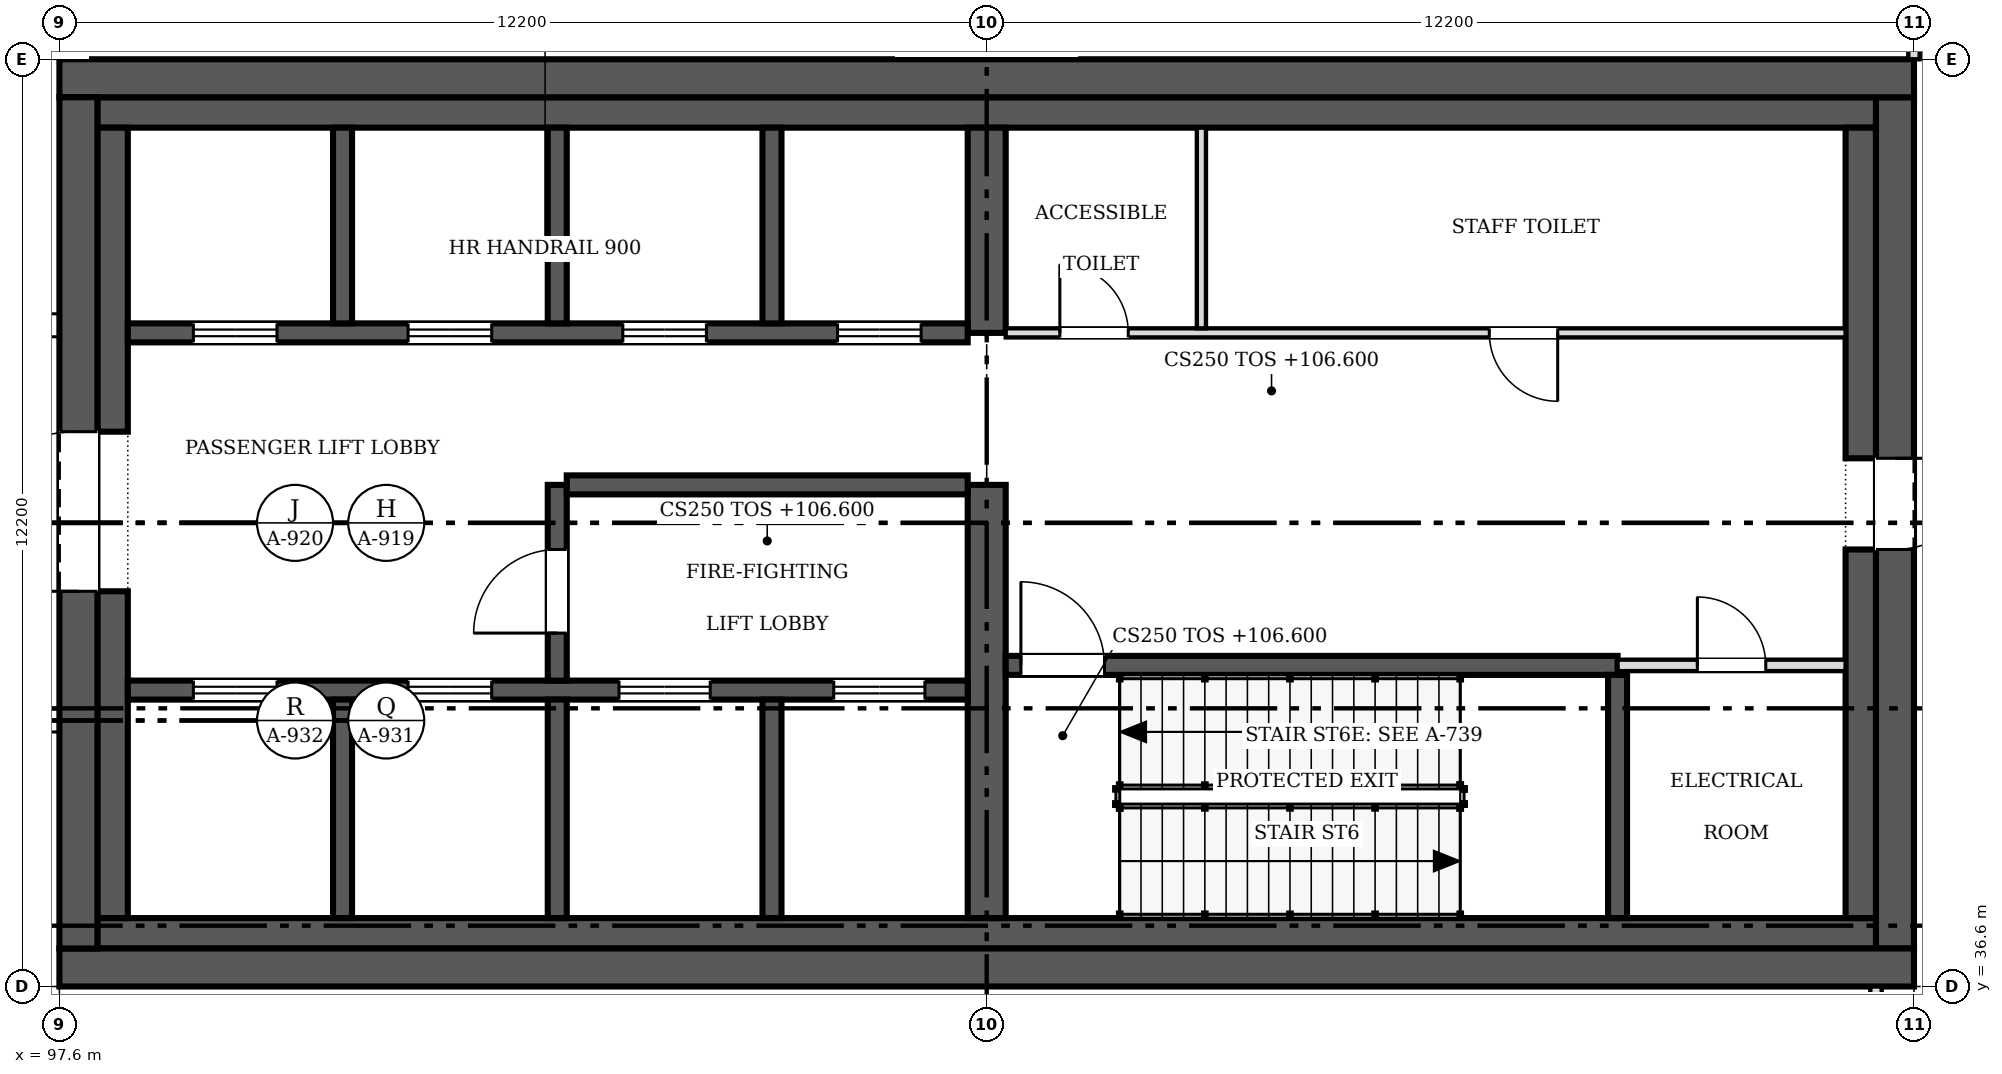
"""IFC4 building model, lengths in metres.
Left out: names, types, materials, properties, quantities, classifications, styles, units other than length and angle.
Written with IfcOpenShell. Run it as: python <this file> out.ifc"""

import sys

from ifc_helpers import new_model, si_unit, direction, frame, frame_2d, origin, place, context, subcontext, project, spatial, rectangle, extrude, source, transform, mapped, element, fill, save


model = new_model("IFC4")
c1 = context("Model", 3, precision=1e-05, world=origin(), true_north=direction((0.0, 1.0)))
c2 = subcontext(c1, "Body", "Model", "MODEL_VIEW")
j1 = project(units=[si_unit("LENGTHUNIT", "METRE"), si_unit("PLANEANGLEUNIT", "RADIAN")], contexts=[c1])
p1 = place(None, origin())
s1 = spatial("IfcSite", under=j1, at=p1, CompositionType="ELEMENT")
p2 = place(p1, origin())
s2 = spatial("IfcBuilding", under=s1, at=p2, CompositionType="ELEMENT")
p3 = place(p2, frame((0.0, 0.0, 106.6)))
s3 = spatial("IfcBuildingStorey", under=s2, at=p3, CompositionType="ELEMENT", Elevation=106.6)
p4 = place(p3, frame((122.0, 36.85, 0.0), z_axis=(0.0, 0.0, 1.0), x_axis=(-1.0, 0.0, 0.0)))
e1 = element("IfcWall", 1, at=p4, inside=s3, PredefinedType="SHEAR", context=c2, shape_type="SweptSolid", body=[
    extrude(rectangle(XDim=24.4, YDim=0.5, at=frame_2d((12.2, 0.0))), origin(), (0.0, 0.0, 1.0), 6.0),
])
p5 = place(p3, frame((97.85, 37.1, 0.0), z_axis=(0.0, 0.0, 1.0), x_axis=(0.0, 1.0, 0.0)))
e2 = element("IfcWall", 2, at=p5, inside=s3, PredefinedType="SHEAR", context=c2, shape_type="SweptSolid", body=[
    extrude(rectangle(XDim=11.2, YDim=0.5, at=frame_2d((5.6, 0.0))), origin(), (0.0, 0.0, 1.0), 6.0),
])
m1 = source(origin(), c2, "Body", "SweptSolid", [
    extrude(rectangle(XDim=2.1, YDim=2.4, at=frame_2d((1.05, 1.2))), frame((0.0, 0.26, 0.0), z_axis=(0.0, -1.0, 0.0), x_axis=(1.0, 0.0, 0.0)), (0.0, 0.0, 1.0), 0.52),
])
p6 = place(p5, frame((4.7, 0.0, 0.0)))
e3 = element("IfcOpeningElement", 3, at=p6, cuts=e2, PredefinedType="OPENING", context=c2, shape_type="MappedRepresentation", body=[
    mapped(m1, transform((0.0, 0.0, 0.0), scale=1.0)),
])
p7 = place(p3, frame((97.6, 48.55, 0.0), z_axis=(0.0, 0.0, 1.0), x_axis=(1.0, 0.0, 0.0)))
e4 = element("IfcWall", 4, at=p7, inside=s3, PredefinedType="SHEAR", context=c2, shape_type="SweptSolid", body=[
    extrude(rectangle(XDim=24.4, YDim=0.5, at=frame_2d((12.2, 0.0))), origin(), (0.0, 0.0, 1.0), 6.0),
])
p8 = place(p3, frame((121.75, 48.3, 0.0), z_axis=(0.0, 0.0, 1.0), x_axis=(0.0, -1.0, 0.0)))
e5 = element("IfcWall", 5, at=p8, inside=s3, PredefinedType="SHEAR", context=c2, shape_type="SweptSolid", body=[
    extrude(rectangle(XDim=11.2, YDim=0.5, at=frame_2d((5.6, 0.0))), origin(), (0.0, 0.0, 1.0), 6.0),
])
m2 = source(origin(), c2, "Body", "SweptSolid", [
    extrude(rectangle(XDim=1.2, YDim=2.1, at=frame_2d((0.6, 1.05))), frame((0.0, 0.26, 0.0), z_axis=(0.0, -1.0, 0.0), x_axis=(1.0, 0.0, 0.0)), (0.0, 0.0, 1.0), 0.52),
])
p9 = place(p8, frame((4.75, 0.0, 0.0)))
e6 = element("IfcOpeningElement", 6, at=p9, cuts=e5, PredefinedType="OPENING", context=c2, shape_type="MappedRepresentation", body=[
    mapped(m2, transform((0.0, 0.0, 0.0), scale=1.0)),
])
for number, where, z_axis, x_axis in (
    (7, (98.1, 37.3, 0.0), (0.0, 0.0, 1.0), (1.0, 0.0, 0.0)),
    (8, (98.1, 48.1, 0.0), (0.0, 0.0, 1.0), (1.0, 0.0, 0.0)),
):
    element("IfcWall", number, at=place(p3, frame(where, z_axis=z_axis, x_axis=x_axis)), inside=s3, PredefinedType="SOLIDWALL", context=c2, shape_type="SweptSolid", body=[
        extrude(rectangle(XDim=23.4, YDim=0.4, at=frame_2d((11.7, 0.0))), origin(), (0.0, 0.0, 1.0), 6.0),
    ])
p10 = place(p3, frame((98.3, 37.5, 0.0), z_axis=(0.0, 0.0, 1.0), x_axis=(0.0, 1.0, 0.0)))
e9 = element("IfcWall", 9, at=p10, inside=s3, PredefinedType="SOLIDWALL", context=c2, shape_type="SweptSolid", body=[
    extrude(rectangle(XDim=4.3, YDim=0.4, at=frame_2d((2.15, 0.0))), origin(), (0.0, 0.0, 1.0), 6.0),
])
p11 = place(p3, frame((98.3, 43.9, 0.0), z_axis=(0.0, 0.0, 1.0), x_axis=(0.0, 1.0, 0.0)))
e10 = element("IfcWall", 10, at=p11, inside=s3, PredefinedType="SOLIDWALL", context=c2, shape_type="SweptSolid", body=[
    extrude(rectangle(XDim=4.0, YDim=0.4, at=frame_2d((2.0, 0.0))), origin(), (0.0, 0.0, 1.0), 6.0),
])
p12 = place(p3, frame((121.3, 37.5, 0.0), z_axis=(0.0, 0.0, 1.0), x_axis=(0.0, 1.0, 0.0)))
e11 = element("IfcWall", 11, at=p12, inside=s3, PredefinedType="SOLIDWALL", context=c2, shape_type="SweptSolid", body=[
    extrude(rectangle(XDim=4.85, YDim=0.4, at=frame_2d((2.425, 0.0))), origin(), (0.0, 0.0, 1.0), 6.0),
])
p13 = place(p3, frame((121.3, 43.55, 0.0), z_axis=(0.0, 0.0, 1.0), x_axis=(0.0, 1.0, 0.0)))
e12 = element("IfcWall", 12, at=p13, inside=s3, PredefinedType="SOLIDWALL", context=c2, shape_type="SweptSolid", body=[
    extrude(rectangle(XDim=4.35, YDim=0.4, at=frame_2d((2.175, 0.0))), origin(), (0.0, 0.0, 1.0), 6.0),
])
p14 = place(p3, frame((109.8, 37.5, 0.0), z_axis=(0.0, 0.0, 1.0), x_axis=(0.0, 1.0, 0.0)))
e13 = element("IfcWall", 13, at=p14, inside=s3, PredefinedType="SHEAR", context=c2, shape_type="SweptSolid", body=[
    extrude(rectangle(XDim=5.7, YDim=0.5, at=frame_2d((2.85, 0.0))), origin(), (0.0, 0.0, 1.0), 6.0),
])
p15 = place(p3, frame((109.8, 45.2, 0.0), z_axis=(0.0, 0.0, 1.0), x_axis=(0.0, 1.0, 0.0)))
e14 = element("IfcWall", 14, at=p15, inside=s3, PredefinedType="SHEAR", context=c2, shape_type="SweptSolid", body=[
    extrude(rectangle(XDim=2.7, YDim=0.5, at=frame_2d((1.35, 0.0))), origin(), (0.0, 0.0, 1.0), 6.0),
])
p16 = place(p3, frame((98.5, 40.5, 0.0), z_axis=(0.0, 0.0, 1.0), x_axis=(1.0, 0.0, 0.0)))
e15 = element("IfcWall", 15, at=p16, inside=s3, PredefinedType="SOLIDWALL", context=c2, shape_type="SweptSolid", body=[
    extrude(rectangle(XDim=11.05, YDim=0.25, at=frame_2d((5.525, 0.0))), origin(), (0.0, 0.0, 1.0), 6.0),
])
m3 = source(origin(), c2, "Body", "SweptSolid", [
    extrude(rectangle(XDim=1.1, YDim=2.1, at=frame_2d((0.55, 1.05))), frame((0.0, 0.135, 0.0), z_axis=(0.0, -1.0, 0.0), x_axis=(1.0, 0.0, 0.0)), (0.0, 0.0, 1.0), 0.27),
])
p17 = place(p16, frame((0.863, 0.0, 0.0)))
e16 = element("IfcOpeningElement", 16, at=p17, cuts=e15, PredefinedType="OPENING", context=c2, shape_type="MappedRepresentation", body=[
    mapped(m3, transform((0.0, 0.0, 0.0), scale=1.0)),
])
p18 = place(p16, frame((3.688, 0.0, 0.0)))
e17 = element("IfcOpeningElement", 17, at=p18, cuts=e15, PredefinedType="OPENING", context=c2, shape_type="MappedRepresentation", body=[
    mapped(m3, transform((0.0, 0.0, 0.0), scale=1.0)),
])
m4 = source(origin(), c2, "Body", "SweptSolid", [
    extrude(rectangle(XDim=1.2, YDim=2.1, at=frame_2d((0.6, 1.05))), frame((0.0, 0.135, 0.0), z_axis=(0.0, -1.0, 0.0), x_axis=(1.0, 0.0, 0.0)), (0.0, 0.0, 1.0), 0.27),
])
p19 = place(p16, frame((6.462, 0.0, 0.0)))
e18 = element("IfcOpeningElement", 18, at=p19, cuts=e15, PredefinedType="OPENING", context=c2, shape_type="MappedRepresentation", body=[
    mapped(m4, transform((0.0, 0.0, 0.0), scale=1.0)),
])
p20 = place(p16, frame((9.288, 0.0, 0.0)))
e19 = element("IfcOpeningElement", 19, at=p20, cuts=e15, PredefinedType="OPENING", context=c2, shape_type="MappedRepresentation", body=[
    mapped(m4, transform((0.0, 0.0, 0.0), scale=1.0)),
])
p21 = place(p3, frame((109.55, 45.2, 0.0), z_axis=(0.0, 0.0, 1.0), x_axis=(-1.0, 0.0, 0.0)))
e20 = element("IfcWall", 20, at=p21, inside=s3, PredefinedType="SOLIDWALL", context=c2, shape_type="SweptSolid", body=[
    extrude(rectangle(XDim=11.05, YDim=0.25, at=frame_2d((5.525, 0.0))), origin(), (0.0, 0.0, 1.0), 6.0),
])
p22 = place(p21, frame((9.087, 0.0, 0.0)))
e21 = element("IfcOpeningElement", 21, at=p22, cuts=e20, PredefinedType="OPENING", context=c2, shape_type="MappedRepresentation", body=[
    mapped(m3, transform((0.0, 0.0, 0.0), scale=1.0)),
])
p23 = place(p21, frame((6.262, 0.0, 0.0)))
e22 = element("IfcOpeningElement", 22, at=p23, cuts=e20, PredefinedType="OPENING", context=c2, shape_type="MappedRepresentation", body=[
    mapped(m3, transform((0.0, 0.0, 0.0), scale=1.0)),
])
p24 = place(p21, frame((3.438, 0.0, 0.0)))
e23 = element("IfcOpeningElement", 23, at=p24, cuts=e20, PredefinedType="OPENING", context=c2, shape_type="MappedRepresentation", body=[
    mapped(m3, transform((0.0, 0.0, 0.0), scale=1.0)),
])
p25 = place(p21, frame((0.613, 0.0, 0.0)))
e24 = element("IfcOpeningElement", 24, at=p25, cuts=e20, PredefinedType="OPENING", context=c2, shape_type="MappedRepresentation", body=[
    mapped(m3, transform((0.0, 0.0, 0.0), scale=1.0)),
])
p26 = place(p3, frame((118.1, 40.825, 0.0), z_axis=(0.0, 0.0, 1.0), x_axis=(-1.0, 0.0, 0.0)))
e25 = element("IfcWall", 25, at=p26, inside=s3, PredefinedType="SOLIDWALL", context=c2, shape_type="SweptSolid", body=[
    extrude(rectangle(XDim=8.05, YDim=0.25, at=frame_2d((4.025, 0.0))), origin(), (0.0, 0.0, 1.0), 6.0),
])
p27 = place(p26, frame((6.75, 0.0, 0.0)))
e26 = element("IfcOpeningElement", 26, at=p27, cuts=e25, PredefinedType="OPENING", context=c2, shape_type="MappedRepresentation", body=[
    mapped(m3, transform((0.0, 0.0, 0.0), scale=1.0)),
])
p28 = place(p3, frame((104.15, 37.5, 0.0), z_axis=(0.0, 0.0, 1.0), x_axis=(0.0, 1.0, 0.0)))
e27 = element("IfcWall", 27, at=p28, inside=s3, PredefinedType="SOLIDWALL", context=c2, shape_type="SweptSolid", body=[
    extrude(rectangle(XDim=2.875, YDim=0.25, at=frame_2d((1.438, 0.0))), origin(), (0.0, 0.0, 1.0), 6.0),
])
p29 = place(p3, frame((104.15, 43.2, 0.0), z_axis=(0.0, 0.0, 1.0), x_axis=(0.0, -1.0, 0.0)))
e28 = element("IfcWall", 28, at=p29, inside=s3, PredefinedType="SOLIDWALL", context=c2, shape_type="SweptSolid", body=[
    extrude(rectangle(XDim=2.575, YDim=0.25, at=frame_2d((1.288, 0.0))), origin(), (0.0, 0.0, 1.0), 6.0),
])
p30 = place(p29, frame((0.85, 0.0, 0.0)))
e29 = element("IfcOpeningElement", 29, at=p30, cuts=e28, PredefinedType="OPENING", context=c2, shape_type="MappedRepresentation", body=[
    mapped(m3, transform((0.0, 0.0, 0.0), scale=1.0)),
])
p31 = place(p3, frame((104.275, 43.2, 0.0), z_axis=(0.0, 0.0, 1.0), x_axis=(1.0, 0.0, 0.0)))
e30 = element("IfcWall", 30, at=p31, inside=s3, PredefinedType="SOLIDWALL", context=c2, shape_type="SweptSolid", body=[
    extrude(rectangle(XDim=5.275, YDim=0.25, at=frame_2d((2.638, 0.0))), origin(), (0.0, 0.0, 1.0), 6.0),
])
p32 = place(p3, frame((118.1, 37.5, 0.0), z_axis=(0.0, 0.0, 1.0), x_axis=(0.0, 1.0, 0.0)))
e31 = element("IfcWall", 31, at=p32, inside=s3, PredefinedType="SOLIDWALL", context=c2, shape_type="SweptSolid", body=[
    extrude(rectangle(XDim=3.2, YDim=0.25, at=frame_2d((1.6, 0.0))), origin(), (0.0, 0.0, 1.0), 6.0),
])
for number, where, z_axis, x_axis in (
    (32, (101.325, 37.5, 0.0), (0.0, 0.0, 1.0), (0.0, 1.0, 0.0)),
    (33, (106.975, 37.5, 0.0), (0.0, 0.0, 1.0), (0.0, 1.0, 0.0)),
):
    element("IfcWall", number, at=place(p3, frame(where, z_axis=z_axis, x_axis=x_axis)), inside=s3, PredefinedType="SOLIDWALL", context=c2, shape_type="SweptSolid", body=[
        extrude(rectangle(XDim=2.875, YDim=0.25, at=frame_2d((1.438, 0.0))), origin(), (0.0, 0.0, 1.0), 6.0),
    ])
for number, where, z_axis, x_axis in (
    (34, (101.325, 45.325, 0.0), (0.0, 0.0, 1.0), (0.0, 1.0, 0.0)),
    (35, (104.15, 45.325, 0.0), (0.0, 0.0, 1.0), (0.0, 1.0, 0.0)),
    (36, (106.975, 45.325, 0.0), (0.0, 0.0, 1.0), (0.0, 1.0, 0.0)),
):
    element("IfcWall", number, at=place(p3, frame(where, z_axis=z_axis, x_axis=x_axis)), inside=s3, PredefinedType="SOLIDWALL", context=c2, shape_type="SweptSolid", body=[
        extrude(rectangle(XDim=2.575, YDim=0.25, at=frame_2d((1.288, 0.0))), origin(), (0.0, 0.0, 1.0), 6.0),
    ])
p33 = place(p3, frame((110.05, 45.2, 0.0), z_axis=(0.0, 0.0, 1.0), x_axis=(1.0, 0.0, 0.0)))
e37 = element("IfcWall", 37, at=p33, inside=s3, PredefinedType="PARTITIONING", context=c2, shape_type="SweptSolid", body=[
    extrude(rectangle(XDim=11.05, YDim=0.12, at=frame_2d((5.525, 0.0))), origin(), (0.0, 0.0, 1.0), 5.8),
])
m5 = source(origin(), c2, "Body", "SweptSolid", [
    extrude(rectangle(XDim=0.9, YDim=2.1, at=frame_2d((0.45, 1.05))), frame((0.0, 0.07, 0.0), z_axis=(0.0, -1.0, 0.0), x_axis=(1.0, 0.0, 0.0)), (0.0, 0.0, 1.0), 0.14),
])
p34 = place(p33, frame((0.712, 0.0, 0.0)))
e38 = element("IfcOpeningElement", 38, at=p34, cuts=e37, PredefinedType="OPENING", context=c2, shape_type="MappedRepresentation", body=[
    mapped(m5, transform((0.0, 0.0, 0.0), scale=1.0)),
])
p35 = place(p33, frame((6.363, 0.0, 0.0)))
e39 = element("IfcOpeningElement", 39, at=p35, cuts=e37, PredefinedType="OPENING", context=c2, shape_type="MappedRepresentation", body=[
    mapped(m5, transform((0.0, 0.0, 0.0), scale=1.0)),
])
p36 = place(p3, frame((121.1, 40.825, 0.0), z_axis=(0.0, 0.0, 1.0), x_axis=(-1.0, 0.0, 0.0)))
e40 = element("IfcWall", 40, at=p36, inside=s3, PredefinedType="PARTITIONING", context=c2, shape_type="SweptSolid", body=[
    extrude(rectangle(XDim=3.0, YDim=0.15, at=frame_2d((1.5, 0.0))), origin(), (0.0, 0.0, 1.0), 5.8),
])
m6 = source(origin(), c2, "Body", "SweptSolid", [
    extrude(rectangle(XDim=0.9, YDim=2.1, at=frame_2d((0.45, 1.05))), frame((0.0, 0.085, 0.0), z_axis=(0.0, -1.0, 0.0), x_axis=(1.0, 0.0, 0.0)), (0.0, 0.0, 1.0), 0.17),
])
p37 = place(p36, frame((1.05, 0.0, 0.0)))
e41 = element("IfcOpeningElement", 41, at=p37, cuts=e40, PredefinedType="OPENING", context=c2, shape_type="MappedRepresentation", body=[
    mapped(m6, transform((0.0, 0.0, 0.0), scale=1.0)),
])
p38 = place(p3, frame((112.625, 45.26, 0.0), z_axis=(0.0, 0.0, 1.0), x_axis=(0.0, 1.0, 0.0)))
e42 = element("IfcWall", 42, at=p38, inside=s3, PredefinedType="PARTITIONING", context=c2, shape_type="SweptSolid", body=[
    extrude(rectangle(XDim=2.64, YDim=0.12, at=frame_2d((1.32, 0.0))), origin(), (0.0, 0.0, 1.0), 5.8),
])
p39 = place(p3, frame((121.5, 36.6, 0.0), z_axis=(0.0, 0.0, 1.0), x_axis=(0.0, -1.0, 0.0)))
e43 = element("IfcWall", 43, at=p39, inside=s3, PredefinedType="PARTITIONING", context=c2, shape_type="SweptSolid", body=[
    extrude(rectangle(XDim=2.324, YDim=0.15, at=frame_2d((1.162, 0.0))), origin(), (0.0, 0.0, 1.0), 5.167),
])
m7 = source(origin(), c2, "Body", "SweptSolid", [
    extrude(rectangle(XDim=1.0, YDim=2.1, at=frame_2d((0.5, 1.05))), frame((0.0, 0.085, 0.0), z_axis=(0.0, -1.0, 0.0), x_axis=(1.0, 0.0, 0.0)), (0.0, 0.0, 1.0), 0.17),
])
p40 = place(p39, frame((0.624, 0.0, 0.0)))
e44 = element("IfcOpeningElement", 44, at=p40, cuts=e43, PredefinedType="OPENING", context=c2, shape_type="MappedRepresentation", body=[
    mapped(m7, transform((0.0, 0.0, 0.0), scale=1.0)),
])
p41 = place(p3, frame((122.0, 48.8, 0.0), z_axis=(0.0, 0.0, 1.0), x_axis=(0.0, 1.0, 0.0)))
e45 = element("IfcWall", 45, at=p41, inside=s3, PredefinedType="PARTITIONING", context=c2, shape_type="SweptSolid", body=[
    extrude(rectangle(XDim=2.324, YDim=0.15, at=frame_2d((1.162, 0.0))), origin(), (0.0, 0.0, 1.0), 5.167),
])
m8 = source(origin(), c2, "Body", "SweptSolid", [
    extrude(rectangle(XDim=2.1, YDim=2.4, at=frame_2d((1.05, 1.2))), frame((0.0, 0.025, 0.0), z_axis=(0.0, -1.0, 0.0), x_axis=(1.0, 0.0, 0.0)), (0.0, 0.0, 1.0), 0.05),
])
p42 = place(p6, origin())
e46 = element("IfcDoor", 46, at=p42, inside=s3, OperationType="DOUBLE_DOOR_SINGLE_SWING", PredefinedType="DOOR", context=c2, shape_type="MappedRepresentation", body=[
    mapped(m8, transform((0.0, 0.0, 0.0), scale=1.0)),
])
fill(e3, e46)
m9 = source(origin(), c2, "Body", "SweptSolid", [
    extrude(rectangle(XDim=1.2, YDim=2.1, at=frame_2d((0.6, 1.05))), frame((0.0, 0.025, 0.0), z_axis=(0.0, -1.0, 0.0), x_axis=(1.0, 0.0, 0.0)), (0.0, 0.0, 1.0), 0.05),
])
p43 = place(p9, origin())
e47 = element("IfcDoor", 47, at=p43, inside=s3, OperationType="SINGLE_SWING_LEFT", PredefinedType="DOOR", context=c2, shape_type="MappedRepresentation", body=[
    mapped(m9, transform((0.0, 0.0, 0.0), scale=1.0)),
])
fill(e6, e47)
m10 = source(origin(), c2, "Body", "SweptSolid", [
    extrude(rectangle(XDim=1.1, YDim=2.1, at=frame_2d((0.55, 1.05))), frame((0.0, 0.025, 0.0), z_axis=(0.0, -1.0, 0.0), x_axis=(1.0, 0.0, 0.0)), (0.0, 0.0, 1.0), 0.05),
])
p44 = place(p17, origin())
e48 = element("IfcDoor", 48, at=p44, inside=s3, OperationType="DOUBLE_DOOR_SLIDING", PredefinedType="DOOR", context=c2, shape_type="MappedRepresentation", body=[
    mapped(m10, transform((0.0, 0.0, 0.0), scale=1.0)),
])
fill(e16, e48)
p45 = place(p18, origin())
e49 = element("IfcDoor", 49, at=p45, inside=s3, OperationType="DOUBLE_DOOR_SLIDING", PredefinedType="DOOR", context=c2, shape_type="MappedRepresentation", body=[
    mapped(m10, transform((0.0, 0.0, 0.0), scale=1.0)),
])
fill(e17, e49)
p46 = place(p19, origin())
e50 = element("IfcDoor", 50, at=p46, inside=s3, OperationType="DOUBLE_DOOR_SLIDING", PredefinedType="DOOR", context=c2, shape_type="MappedRepresentation", body=[
    mapped(m9, transform((0.0, 0.0, 0.0), scale=1.0)),
])
fill(e18, e50)
p47 = place(p20, origin())
e51 = element("IfcDoor", 51, at=p47, inside=s3, OperationType="DOUBLE_DOOR_SLIDING", PredefinedType="DOOR", context=c2, shape_type="MappedRepresentation", body=[
    mapped(m9, transform((0.0, 0.0, 0.0), scale=1.0)),
])
fill(e19, e51)
p48 = place(p22, origin())
e52 = element("IfcDoor", 52, at=p48, inside=s3, OperationType="DOUBLE_DOOR_SLIDING", PredefinedType="DOOR", context=c2, shape_type="MappedRepresentation", body=[
    mapped(m10, transform((0.0, 0.0, 0.0), scale=1.0)),
])
fill(e21, e52)
p49 = place(p23, origin())
e53 = element("IfcDoor", 53, at=p49, inside=s3, OperationType="DOUBLE_DOOR_SLIDING", PredefinedType="DOOR", context=c2, shape_type="MappedRepresentation", body=[
    mapped(m10, transform((0.0, 0.0, 0.0), scale=1.0)),
])
fill(e22, e53)
p50 = place(p24, origin())
e54 = element("IfcDoor", 54, at=p50, inside=s3, OperationType="DOUBLE_DOOR_SLIDING", PredefinedType="DOOR", context=c2, shape_type="MappedRepresentation", body=[
    mapped(m10, transform((0.0, 0.0, 0.0), scale=1.0)),
])
fill(e23, e54)
p51 = place(p25, origin())
e55 = element("IfcDoor", 55, at=p51, inside=s3, OperationType="DOUBLE_DOOR_SLIDING", PredefinedType="DOOR", context=c2, shape_type="MappedRepresentation", body=[
    mapped(m10, transform((0.0, 0.0, 0.0), scale=1.0)),
])
fill(e24, e55)
p52 = place(p27, origin())
e56 = element("IfcDoor", 56, at=p52, inside=s3, OperationType="SINGLE_SWING_RIGHT", PredefinedType="DOOR", context=c2, shape_type="MappedRepresentation", body=[
    mapped(m10, transform((0.0, 0.0, 0.0), scale=1.0)),
])
fill(e26, e56)
p53 = place(p30, origin())
e57 = element("IfcDoor", 57, at=p53, inside=s3, OperationType="SINGLE_SWING_RIGHT", PredefinedType="DOOR", context=c2, shape_type="MappedRepresentation", body=[
    mapped(m10, transform((0.0, 0.0, 0.0), scale=1.0)),
])
fill(e29, e57)
m11 = source(origin(), c2, "Body", "SweptSolid", [
    extrude(rectangle(XDim=0.9, YDim=2.1, at=frame_2d((0.45, 1.05))), frame((0.0, 0.025, 0.0), z_axis=(0.0, -1.0, 0.0), x_axis=(1.0, 0.0, 0.0)), (0.0, 0.0, 1.0), 0.05),
])
p54 = place(p34, origin())
e58 = element("IfcDoor", 58, at=p54, inside=s3, OperationType="SINGLE_SWING_LEFT", PredefinedType="DOOR", context=c2, shape_type="MappedRepresentation", body=[
    mapped(m11, transform((0.0, 0.0, 0.0), scale=1.0)),
])
fill(e38, e58)
p55 = place(p35, origin())
e59 = element("IfcDoor", 59, at=p55, inside=s3, OperationType="SINGLE_SWING_RIGHT", PredefinedType="DOOR", context=c2, shape_type="MappedRepresentation", body=[
    mapped(m11, transform((0.0, 0.0, 0.0), scale=1.0)),
])
fill(e39, e59)
p56 = place(p37, origin())
e60 = element("IfcDoor", 60, at=p56, inside=s3, OperationType="SINGLE_SWING_RIGHT", PredefinedType="DOOR", context=c2, shape_type="MappedRepresentation", body=[
    mapped(m11, transform((0.0, 0.0, 0.0), scale=1.0)),
])
fill(e41, e60)
save(model, sys.argv[1])
